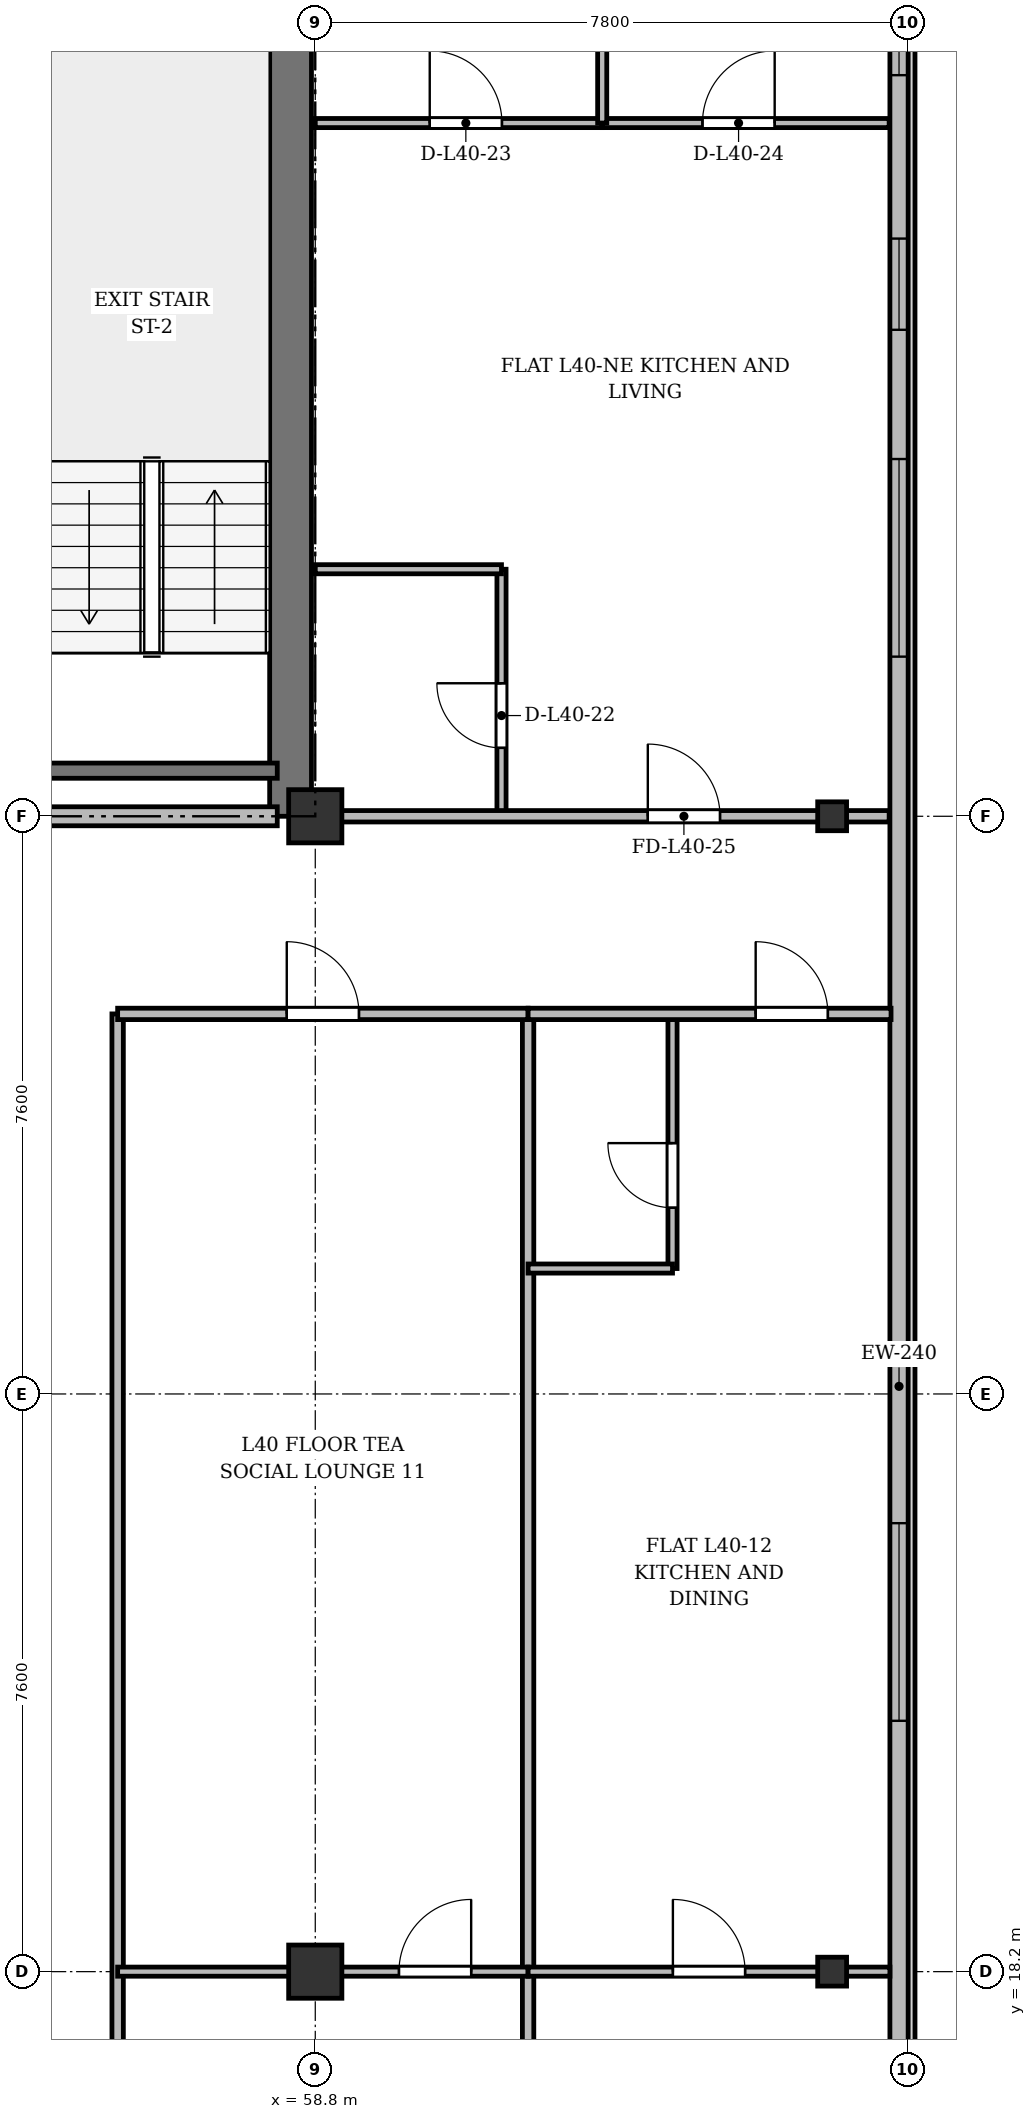
"""IFC4 building model, lengths in metres.
Left out: names, types, materials, properties, quantities, classifications, styles, units other than length and angle.
Written with IfcOpenShell. Run it as: python <this file> out.ifc"""

import sys

from ifc_helpers import new_model, si_unit, direction, frame, frame_2d, origin, origin_2d, place, context, subcontext, project, spatial, rectangle, i_section, extrude, source, transform, mapped, element, fill, save


model = new_model("IFC4")
c1 = context("Model", 3, precision=1e-05, world=origin(), true_north=direction((0.0, 1.0)))
c2 = subcontext(c1, "Body", "Model", "MODEL_VIEW")
j1 = project(units=[si_unit("LENGTHUNIT", "METRE"), si_unit("PLANEANGLEUNIT", "RADIAN")], contexts=[c1])
p1 = place(None, origin())
s1 = spatial("IfcSite", under=j1, at=p1, CompositionType="ELEMENT")
p2 = place(p1, origin())
s2 = spatial("IfcBuilding", under=s1, at=p2, CompositionType="ELEMENT")
p3 = place(p2, frame((0.0, 0.0, 153.7)))
s3 = spatial("IfcBuildingStorey", under=s2, at=p3, CompositionType="ELEMENT", Elevation=153.7)
m1 = source(origin(), c2, "Body", "SweptSolid", [
    extrude(rectangle(XDim=0.7, YDim=0.7, at=origin_2d()), origin(), (0.0, 0.0, 1.0), 3.6),
])
for number, where, z_axis, x_axis in (
    (1, (58.8, 18.2, 0.0), (0.0, 0.0, 1.0), (1.0, 0.0, 0.0)),
    (2, (58.8, 33.4, 0.0), (0.0, 0.0, 1.0), (1.0, 0.0, 0.0)),
):
    element("IfcColumn", number, at=place(p3, frame(where, z_axis=z_axis, x_axis=x_axis)), inside=s3, PredefinedType="COLUMN", context=c2, shape_type="MappedRepresentation", body=[
        mapped(m1, transform((0.0, 0.0, 0.0), x_axis=(1.0, 0.0, 0.0), y_axis=(0.0, 1.0, 0.0), z_axis=(0.0, 0.0, 1.0), scale=1.0)),
    ])
m2 = source(origin(), c2, "Body", "SweptSolid", [
    extrude(i_section(OverallWidth=0.38, OverallDepth=0.38, WebThickness=0.02, FlangeThickness=0.03, at=origin_2d()), origin(), (0.0, 0.0, 1.0), 3.6),
])
for number, where, z_axis, x_axis in (
    (3, (65.6, 18.2, 0.0), (0.0, 0.0, 1.0), (1.0, 0.0, 0.0)),
    (4, (65.6, 33.4, 0.0), (0.0, 0.0, 1.0), (1.0, 0.0, 0.0)),
):
    element("IfcColumn", number, at=place(p3, frame(where, z_axis=z_axis, x_axis=x_axis)), inside=s3, PredefinedType="COLUMN", context=c2, shape_type="MappedRepresentation", body=[
        mapped(m2, transform((0.0, 0.0, 0.0), x_axis=(1.0, 0.0, 0.0), y_axis=(0.0, 1.0, 0.0), z_axis=(0.0, 0.0, 1.0), scale=1.0)),
    ])
p4 = place(p3, frame((66.48, 45.5, 0.0), z_axis=(0.0, 0.0, 1.0), x_axis=(0.0, -1.0, 0.0)))
e5 = element("IfcWall", 5, at=p4, inside=s3, PredefinedType="SOLIDWALL", context=c2, shape_type="SweptSolid", body=[
    extrude(rectangle(XDim=39.2, YDim=0.24, at=frame_2d((19.6, 0.0))), origin(), (0.0, 0.0, 1.0), 3.35),
])
p5 = place(p4, frame((36.55, 0.0, 0.92)))
e6 = element("IfcOpeningElement", 6, at=p5, cuts=e5, PredefinedType="OPENING", context=c2, shape_type="SweptSolid", body=[
    extrude(rectangle(XDim=1.2, YDim=1.65, at=frame_2d((0.6, 0.825))), frame((0.0, 0.13, 0.0), z_axis=(0.0, -1.0, 0.0), x_axis=(1.0, 0.0, 0.0)), (0.0, 0.0, 1.0), 0.26),
])
p6 = place(p4, frame((32.8, 0.0, 0.92)))
e7 = element("IfcOpeningElement", 7, at=p6, cuts=e5, PredefinedType="OPENING", context=c2, shape_type="SweptSolid", body=[
    extrude(rectangle(XDim=2.6, YDim=1.9, at=frame_2d((1.3, 0.95))), frame((0.0, 0.13, 0.0), z_axis=(0.0, -1.0, 0.0), x_axis=(1.0, 0.0, 0.0)), (0.0, 0.0, 1.0), 0.26),
])
p7 = place(p4, frame((28.6, 0.0, 0.92)))
e8 = element("IfcOpeningElement", 8, at=p7, cuts=e5, PredefinedType="OPENING", context=c2, shape_type="SweptSolid", body=[
    extrude(rectangle(XDim=2.6, YDim=1.9, at=frame_2d((1.3, 0.95))), frame((0.0, 0.13, 0.0), z_axis=(0.0, -1.0, 0.0), x_axis=(1.0, 0.0, 0.0)), (0.0, 0.0, 1.0), 0.26),
])
p8 = place(p4, frame((21.4, 0.0, 0.92)))
e9 = element("IfcOpeningElement", 9, at=p8, cuts=e5, PredefinedType="OPENING", context=c2, shape_type="SweptSolid", body=[
    extrude(rectangle(XDim=2.6, YDim=1.9, at=frame_2d((1.3, 0.95))), frame((0.0, 0.13, 0.0), z_axis=(0.0, -1.0, 0.0), x_axis=(1.0, 0.0, 0.0)), (0.0, 0.0, 1.0), 0.26),
])
p9 = place(p4, frame((7.4, 0.0, 0.92)))
e10 = element("IfcOpeningElement", 10, at=p9, cuts=e5, PredefinedType="OPENING", context=c2, shape_type="SweptSolid", body=[
    extrude(rectangle(XDim=2.6, YDim=1.9, at=frame_2d((1.3, 0.95))), frame((0.0, 0.13, 0.0), z_axis=(0.0, -1.0, 0.0), x_axis=(1.0, 0.0, 0.0)), (0.0, 0.0, 1.0), 0.26),
])
p10 = place(p4, frame((4.5, 0.0, 0.92)))
e11 = element("IfcOpeningElement", 11, at=p10, cuts=e5, PredefinedType="OPENING", context=c2, shape_type="SweptSolid", body=[
    extrude(rectangle(XDim=1.2, YDim=1.65, at=frame_2d((0.6, 0.825))), frame((0.0, 0.13, 0.0), z_axis=(0.0, -1.0, 0.0), x_axis=(1.0, 0.0, 0.0)), (0.0, 0.0, 1.0), 0.26),
])
p11 = place(p4, frame((1.15, 0.0, 0.92)))
e12 = element("IfcOpeningElement", 12, at=p11, cuts=e5, PredefinedType="OPENING", context=c2, shape_type="SweptSolid", body=[
    extrude(rectangle(XDim=1.2, YDim=1.65, at=frame_2d((0.6, 0.825))), frame((0.0, 0.13, 0.0), z_axis=(0.0, -1.0, 0.0), x_axis=(1.0, 0.0, 0.0)), (0.0, 0.0, 1.0), 0.26),
])
p12 = place(p3, frame((58.475, 33.4, 0.0), z_axis=(0.0, 0.0, 1.0), x_axis=(0.0, 1.0, 0.0)))
e13 = element("IfcWall", 13, at=p12, inside=s3, PredefinedType="SHEAR", context=c2, shape_type="SweptSolid", body=[
    extrude(rectangle(XDim=11.55, YDim=0.55, at=frame_2d((5.775, 0.0))), origin(), (0.0, 0.0, 1.0), 3.35),
])
p13 = place(p3, frame((54.9, 34.0, 0.0), z_axis=(0.0, 0.0, 1.0), x_axis=(1.0, 0.0, 0.0)))
e14 = element("IfcWall", 14, at=p13, inside=s3, PredefinedType="SHEAR", context=c2, shape_type="SweptSolid", body=[
    extrude(rectangle(XDim=3.4, YDim=0.2, at=frame_2d((1.7, 0.0))), origin(), (0.0, 0.0, 1.0), 3.35),
])
p14 = place(p3, frame((47.15, 33.4, 0.0), z_axis=(0.0, 0.0, 1.0), x_axis=(1.0, 0.0, 0.0)))
e15 = element("IfcWall", 15, at=p14, inside=s3, PredefinedType="PARTITIONING", context=c2, shape_type="SweptSolid", body=[
    extrude(rectangle(XDim=11.15, YDim=0.25, at=frame_2d((5.575, 0.0))), origin(), (0.0, 0.0, 1.0), 2.75),
])
p15 = place(p14, frame((0.7, 0.0, 0.0)))
e16 = element("IfcOpeningElement", 16, at=p15, cuts=e15, PredefinedType="OPENING", context=c2, shape_type="SweptSolid", body=[
    extrude(rectangle(XDim=0.95, YDim=2.15, at=frame_2d((0.475, 1.075))), frame((0.0, 0.135, 0.0), z_axis=(0.0, -1.0, 0.0), x_axis=(1.0, 0.0, 0.0)), (0.0, 0.0, 1.0), 0.27),
])
p16 = place(p14, frame((6.0, 0.0, 0.0)))
e17 = element("IfcOpeningElement", 17, at=p16, cuts=e15, PredefinedType="OPENING", context=c2, shape_type="SweptSolid", body=[
    extrude(rectangle(XDim=1.2, YDim=2.15, at=frame_2d((0.6, 1.075))), frame((0.0, 0.135, 0.0), z_axis=(0.0, -1.0, 0.0), x_axis=(1.0, 0.0, 0.0)), (0.0, 0.0, 1.0), 0.27),
])
p17 = place(p3, frame((61.25, 33.4, 0.0), z_axis=(0.0, 0.0, 1.0), x_axis=(0.0, 1.0, 0.0)))
e18 = element("IfcWall", 18, at=p17, inside=s3, PredefinedType="PARTITIONING", context=c2, shape_type="SweptSolid", body=[
    extrude(rectangle(XDim=3.25, YDim=0.12, at=frame_2d((1.625, 0.0))), origin(), (0.0, 0.0, 1.0), 2.75),
])
p18 = place(p17, frame((0.9, 0.0, 0.0)))
e19 = element("IfcOpeningElement", 19, at=p18, cuts=e18, PredefinedType="OPENING", context=c2, shape_type="SweptSolid", body=[
    extrude(rectangle(XDim=0.85, YDim=2.1, at=frame_2d((0.425, 1.05))), frame((0.0, 0.07, 0.0), z_axis=(0.0, -1.0, 0.0), x_axis=(1.0, 0.0, 0.0)), (0.0, 0.0, 1.0), 0.14),
])
p19 = place(p3, frame((58.8, 36.65, 0.0), z_axis=(0.0, 0.0, 1.0), x_axis=(1.0, 0.0, 0.0)))
e20 = element("IfcWall", 20, at=p19, inside=s3, PredefinedType="PARTITIONING", context=c2, shape_type="SweptSolid", body=[
    extrude(rectangle(XDim=2.45, YDim=0.12, at=frame_2d((1.225, 0.0))), origin(), (0.0, 0.0, 1.0), 2.85),
])
p20 = place(p3, frame((58.8, 42.52, 0.0), z_axis=(0.0, 0.0, 1.0), x_axis=(1.0, 0.0, 0.0)))
e21 = element("IfcWall", 21, at=p20, inside=s3, PredefinedType="PARTITIONING", context=c2, shape_type="SweptSolid", body=[
    extrude(rectangle(XDim=3.775, YDim=0.12, at=frame_2d((1.887, 0.0))), origin(), (0.0, 0.0, 1.0), 2.85),
])
p21 = place(p20, frame((1.506, 0.0, 0.0)))
e22 = element("IfcOpeningElement", 22, at=p21, cuts=e21, PredefinedType="OPENING", context=c2, shape_type="SweptSolid", body=[
    extrude(rectangle(XDim=0.95, YDim=2.15, at=frame_2d((0.475, 1.075))), frame((0.0, 0.07, 0.0), z_axis=(0.0, -1.0, 0.0), x_axis=(1.0, 0.0, 0.0)), (0.0, 0.0, 1.0), 0.14),
])
p22 = place(p3, frame((62.575, 42.52, 0.0), z_axis=(0.0, 0.0, 1.0), x_axis=(1.0, 0.0, 0.0)))
e23 = element("IfcWall", 23, at=p22, inside=s3, PredefinedType="PARTITIONING", context=c2, shape_type="SweptSolid", body=[
    extrude(rectangle(XDim=3.775, YDim=0.12, at=frame_2d((1.888, 0.0))), origin(), (0.0, 0.0, 1.0), 2.85),
])
p23 = place(p22, frame((1.319, 0.0, 0.0)))
e24 = element("IfcOpeningElement", 24, at=p23, cuts=e23, PredefinedType="OPENING", context=c2, shape_type="SweptSolid", body=[
    extrude(rectangle(XDim=0.95, YDim=2.15, at=frame_2d((0.475, 1.075))), frame((0.0, 0.07, 0.0), z_axis=(0.0, -1.0, 0.0), x_axis=(1.0, 0.0, 0.0)), (0.0, 0.0, 1.0), 0.14),
])
p24 = place(p3, frame((62.575, 42.52, 0.0), z_axis=(0.0, 0.0, 1.0), x_axis=(0.0, 1.0, 0.0)))
e25 = element("IfcWall", 25, at=p24, inside=s3, PredefinedType="PARTITIONING", context=c2, shape_type="SweptSolid", body=[
    extrude(rectangle(XDim=5.74, YDim=0.12, at=frame_2d((2.87, 0.0))), origin(), (0.0, 0.0, 1.0), 2.75),
])
p25 = place(p3, frame((58.8, 33.4, 0.0), z_axis=(0.0, 0.0, 1.0), x_axis=(1.0, 0.0, 0.0)))
e26 = element("IfcWall", 26, at=p25, inside=s3, PredefinedType="PARTITIONING", context=c2, shape_type="SweptSolid", body=[
    extrude(rectangle(XDim=7.55, YDim=0.15, at=frame_2d((3.775, 0.0))), origin(), (0.0, 0.0, 1.0), 2.75),
])
p26 = place(p25, frame((4.375, 0.0, 0.0)))
e27 = element("IfcOpeningElement", 27, at=p26, cuts=e26, PredefinedType="OPENING", context=c2, shape_type="SweptSolid", body=[
    extrude(rectangle(XDim=0.95, YDim=2.15, at=frame_2d((0.475, 1.075))), frame((0.0, 0.085, 0.0), z_axis=(0.0, -1.0, 0.0), x_axis=(1.0, 0.0, 0.0)), (0.0, 0.0, 1.0), 0.17),
])
for number, where, z_axis, x_axis in (
    (28, (61.6, 3.525, 0.0), (0.0, 0.0, 1.0), (0.0, 1.0, 0.0)),
    (29, (56.2, 3.525, 0.0), (0.0, 0.0, 1.0), (0.0, 1.0, 0.0)),
):
    element("IfcWall", number, at=place(p3, frame(where, z_axis=z_axis, x_axis=x_axis)), inside=s3, PredefinedType="PARTITIONING", context=c2, shape_type="SweptSolid", body=[
        extrude(rectangle(XDim=27.275, YDim=0.15, at=frame_2d((13.638, 0.0))), origin(), (0.0, 0.0, 1.0), 2.75),
    ])
p27 = place(p3, frame((56.2, 30.8, 0.0), z_axis=(0.0, 0.0, 1.0), x_axis=(1.0, 0.0, 0.0)))
e30 = element("IfcWall", 30, at=p27, inside=s3, PredefinedType="PARTITIONING", context=c2, shape_type="SweptSolid", body=[
    extrude(rectangle(XDim=5.4, YDim=0.15, at=frame_2d((2.7, 0.0))), origin(), (0.0, 0.0, 1.0), 2.85),
])
p28 = place(p27, frame((2.225, 0.0, 0.0)))
e31 = element("IfcOpeningElement", 31, at=p28, cuts=e30, PredefinedType="OPENING", context=c2, shape_type="SweptSolid", body=[
    extrude(rectangle(XDim=0.95, YDim=2.15, at=frame_2d((0.475, 1.075))), frame((0.0, 0.085, 0.0), z_axis=(0.0, -1.0, 0.0), x_axis=(1.0, 0.0, 0.0)), (0.0, 0.0, 1.0), 0.17),
])
p29 = place(p3, frame((56.2, 18.2, 0.0), z_axis=(0.0, 0.0, 1.0), x_axis=(1.0, 0.0, 0.0)))
e32 = element("IfcWall", 32, at=p29, inside=s3, PredefinedType="PARTITIONING", context=c2, shape_type="SweptSolid", body=[
    extrude(rectangle(XDim=5.4, YDim=0.12, at=frame_2d((2.7, 0.0))), origin(), (0.0, 0.0, 1.0), 2.75),
])
p30 = place(p29, frame((3.701, 0.0, 0.0)))
e33 = element("IfcOpeningElement", 33, at=p30, cuts=e32, PredefinedType="OPENING", context=c2, shape_type="SweptSolid", body=[
    extrude(rectangle(XDim=0.95, YDim=2.15, at=frame_2d((0.475, 1.075))), frame((0.0, 0.07, 0.0), z_axis=(0.0, -1.0, 0.0), x_axis=(1.0, 0.0, 0.0)), (0.0, 0.0, 1.0), 0.14),
])
p31 = place(p3, frame((61.6, 18.2, 0.0), z_axis=(0.0, 0.0, 1.0), x_axis=(1.0, 0.0, 0.0)))
e34 = element("IfcWall", 34, at=p31, inside=s3, PredefinedType="PARTITIONING", context=c2, shape_type="SweptSolid", body=[
    extrude(rectangle(XDim=4.76, YDim=0.12, at=frame_2d((2.38, 0.0))), origin(), (0.0, 0.0, 1.0), 2.75),
])
p32 = place(p31, frame((1.905, 0.0, 0.0)))
e35 = element("IfcOpeningElement", 35, at=p32, cuts=e34, PredefinedType="OPENING", context=c2, shape_type="SweptSolid", body=[
    extrude(rectangle(XDim=0.95, YDim=2.15, at=frame_2d((0.475, 1.075))), frame((0.0, 0.07, 0.0), z_axis=(0.0, -1.0, 0.0), x_axis=(1.0, 0.0, 0.0)), (0.0, 0.0, 1.0), 0.14),
])
p33 = place(p3, frame((63.5, 27.45, 0.0), z_axis=(0.0, 0.0, 1.0), x_axis=(0.0, 1.0, 0.0)))
e36 = element("IfcWall", 36, at=p33, inside=s3, PredefinedType="PARTITIONING", context=c2, shape_type="SweptSolid", body=[
    extrude(rectangle(XDim=3.35, YDim=0.12, at=frame_2d((1.675, 0.0))), origin(), (0.0, 0.0, 1.0), 3.35),
])
p34 = place(p33, frame((0.8, 0.0, 0.0)))
e37 = element("IfcOpeningElement", 37, at=p34, cuts=e36, PredefinedType="OPENING", context=c2, shape_type="SweptSolid", body=[
    extrude(rectangle(XDim=0.85, YDim=2.1, at=frame_2d((0.425, 1.05))), frame((0.0, 0.07, 0.0), z_axis=(0.0, -1.0, 0.0), x_axis=(1.0, 0.0, 0.0)), (0.0, 0.0, 1.0), 0.14),
])
p35 = place(p3, frame((61.6, 27.45, 0.0), z_axis=(0.0, 0.0, 1.0), x_axis=(1.0, 0.0, 0.0)))
e38 = element("IfcWall", 38, at=p35, inside=s3, PredefinedType="PARTITIONING", context=c2, shape_type="SweptSolid", body=[
    extrude(rectangle(XDim=1.9, YDim=0.12, at=frame_2d((0.95, 0.0))), origin(), (0.0, 0.0, 1.0), 3.35),
])
p36 = place(p3, frame((61.6, 30.8, 0.0), z_axis=(0.0, 0.0, 1.0), x_axis=(1.0, 0.0, 0.0)))
e39 = element("IfcWall", 39, at=p36, inside=s3, PredefinedType="PARTITIONING", context=c2, shape_type="SweptSolid", body=[
    extrude(rectangle(XDim=4.775, YDim=0.15, at=frame_2d((2.387, 0.0))), origin(), (0.0, 0.0, 1.0), 2.85),
])
p37 = place(p36, frame((2.994, 0.0, 0.0)))
e40 = element("IfcOpeningElement", 40, at=p37, cuts=e39, PredefinedType="OPENING", context=c2, shape_type="SweptSolid", body=[
    extrude(rectangle(XDim=0.95, YDim=2.15, at=frame_2d((0.475, 1.075))), frame((0.0, 0.085, 0.0), z_axis=(0.0, -1.0, 0.0), x_axis=(1.0, 0.0, 0.0)), (0.0, 0.0, 1.0), 0.17),
])
m3 = source(origin(), c2, "Body", "SweptSolid", [
    extrude(rectangle(XDim=2.6, YDim=1.9, at=frame_2d((1.3, 0.95))), frame((0.0, 0.03, 0.0), z_axis=(0.0, -1.0, 0.0), x_axis=(1.0, 0.0, 0.0)), (0.0, 0.0, 1.0), 0.06),
])
p38 = place(p8, origin())
e41 = element("IfcWindow", 41, at=p38, inside=s3, PartitioningType="SINGLE_PANEL", PredefinedType="WINDOW", context=c2, shape_type="MappedRepresentation", body=[
    mapped(m3, transform((0.0, 0.0, 0.0), x_axis=(1.0, 0.0, 0.0), y_axis=(0.0, 1.0, 0.0), z_axis=(0.0, 0.0, 1.0), scale=1.0)),
])
fill(e9, e41)
p39 = place(p9, origin())
e42 = element("IfcWindow", 42, at=p39, inside=s3, PartitioningType="SINGLE_PANEL", PredefinedType="WINDOW", context=c2, shape_type="MappedRepresentation", body=[
    mapped(m3, transform((0.0, 0.0, 0.0), x_axis=(1.0, 0.0, 0.0), y_axis=(0.0, 1.0, 0.0), z_axis=(0.0, 0.0, 1.0), scale=1.0)),
])
fill(e10, e42)
m4 = source(origin(), c2, "Body", "SweptSolid", [
    extrude(rectangle(XDim=1.2, YDim=1.65, at=frame_2d((0.6, 0.825))), frame((0.0, 0.03, 0.0), z_axis=(0.0, -1.0, 0.0), x_axis=(1.0, 0.0, 0.0)), (0.0, 0.0, 1.0), 0.06),
])
p40 = place(p10, origin())
e43 = element("IfcWindow", 43, at=p40, inside=s3, PartitioningType="SINGLE_PANEL", PredefinedType="WINDOW", context=c2, shape_type="MappedRepresentation", body=[
    mapped(m4, transform((0.0, 0.0, 0.0), x_axis=(1.0, 0.0, 0.0), y_axis=(0.0, 1.0, 0.0), z_axis=(0.0, 0.0, 1.0), scale=1.0)),
])
fill(e11, e43)
p41 = place(p11, origin())
e44 = element("IfcWindow", 44, at=p41, inside=s3, PartitioningType="SINGLE_PANEL", PredefinedType="WINDOW", context=c2, shape_type="MappedRepresentation", body=[
    mapped(m4, transform((0.0, 0.0, 0.0), x_axis=(1.0, 0.0, 0.0), y_axis=(0.0, 1.0, 0.0), z_axis=(0.0, 0.0, 1.0), scale=1.0)),
])
fill(e12, e44)
m5 = source(origin(), c2, "Body", "SweptSolid", [
    extrude(rectangle(XDim=0.85, YDim=2.1, at=frame_2d((0.425, 1.05))), frame((0.0, 0.025, 0.0), z_axis=(0.0, -1.0, 0.0), x_axis=(1.0, 0.0, 0.0)), (0.0, 0.0, 1.0), 0.05),
])
p42 = place(p18, origin())
e45 = element("IfcDoor", 45, at=p42, inside=s3, OperationType="SINGLE_SWING_RIGHT", PredefinedType="DOOR", context=c2, shape_type="MappedRepresentation", body=[
    mapped(m5, transform((0.0, 0.0, 0.0), x_axis=(1.0, 0.0, 0.0), y_axis=(0.0, 1.0, 0.0), z_axis=(0.0, 0.0, 1.0), scale=1.0)),
])
fill(e19, e45)
m6 = source(origin(), c2, "Body", "SweptSolid", [
    extrude(rectangle(XDim=0.95, YDim=2.15, at=frame_2d((0.475, 1.075))), frame((0.0, 0.025, 0.0), z_axis=(0.0, -1.0, 0.0), x_axis=(1.0, 0.0, 0.0)), (0.0, 0.0, 1.0), 0.05),
])
p43 = place(p21, origin())
e46 = element("IfcDoor", 46, at=p43, inside=s3, OperationType="SINGLE_SWING_LEFT", PredefinedType="DOOR", context=c2, shape_type="MappedRepresentation", body=[
    mapped(m6, transform((0.0, 0.0, 0.0), x_axis=(1.0, 0.0, 0.0), y_axis=(0.0, 1.0, 0.0), z_axis=(0.0, 0.0, 1.0), scale=1.0)),
])
fill(e22, e46)
p44 = place(p23, origin())
e47 = element("IfcDoor", 47, at=p44, inside=s3, OperationType="SINGLE_SWING_RIGHT", PredefinedType="DOOR", context=c2, shape_type="MappedRepresentation", body=[
    mapped(m6, transform((0.0, 0.0, 0.0), x_axis=(1.0, 0.0, 0.0), y_axis=(0.0, 1.0, 0.0), z_axis=(0.0, 0.0, 1.0), scale=1.0)),
])
fill(e24, e47)
p45 = place(p26, origin())
e48 = element("IfcDoor", 48, at=p45, inside=s3, OperationType="SINGLE_SWING_LEFT", PredefinedType="DOOR", context=c2, shape_type="MappedRepresentation", body=[
    mapped(m6, transform((0.0, 0.0, 0.0), x_axis=(1.0, 0.0, 0.0), y_axis=(0.0, 1.0, 0.0), z_axis=(0.0, 0.0, 1.0), scale=1.0)),
])
fill(e27, e48)
p46 = place(p28, origin())
e49 = element("IfcDoor", 49, at=p46, inside=s3, OperationType="SINGLE_SWING_LEFT", PredefinedType="DOOR", context=c2, shape_type="MappedRepresentation", body=[
    mapped(m6, transform((0.0, 0.0, 0.0), x_axis=(1.0, 0.0, 0.0), y_axis=(0.0, 1.0, 0.0), z_axis=(0.0, 0.0, 1.0), scale=1.0)),
])
fill(e31, e49)
p47 = place(p30, origin())
e50 = element("IfcDoor", 50, at=p47, inside=s3, OperationType="SINGLE_SWING_RIGHT", PredefinedType="DOOR", context=c2, shape_type="MappedRepresentation", body=[
    mapped(m6, transform((0.0, 0.0, 0.0), x_axis=(1.0, 0.0, 0.0), y_axis=(0.0, 1.0, 0.0), z_axis=(0.0, 0.0, 1.0), scale=1.0)),
])
fill(e33, e50)
p48 = place(p32, origin())
e51 = element("IfcDoor", 51, at=p48, inside=s3, OperationType="SINGLE_SWING_LEFT", PredefinedType="DOOR", context=c2, shape_type="MappedRepresentation", body=[
    mapped(m6, transform((0.0, 0.0, 0.0), x_axis=(1.0, 0.0, 0.0), y_axis=(0.0, 1.0, 0.0), z_axis=(0.0, 0.0, 1.0), scale=1.0)),
])
fill(e35, e51)
p49 = place(p34, origin())
e52 = element("IfcDoor", 52, at=p49, inside=s3, OperationType="SINGLE_SWING_RIGHT", PredefinedType="DOOR", context=c2, shape_type="MappedRepresentation", body=[
    mapped(m5, transform((0.0, 0.0, 0.0), x_axis=(1.0, 0.0, 0.0), y_axis=(0.0, 1.0, 0.0), z_axis=(0.0, 0.0, 1.0), scale=1.0)),
])
fill(e37, e52)
p50 = place(p37, origin())
e53 = element("IfcDoor", 53, at=p50, inside=s3, OperationType="SINGLE_SWING_LEFT", PredefinedType="DOOR", context=c2, shape_type="MappedRepresentation", body=[
    mapped(m6, transform((0.0, 0.0, 0.0), x_axis=(1.0, 0.0, 0.0), y_axis=(0.0, 1.0, 0.0), z_axis=(0.0, 0.0, 1.0), scale=1.0)),
])
fill(e40, e53)
save(model, sys.argv[1])
